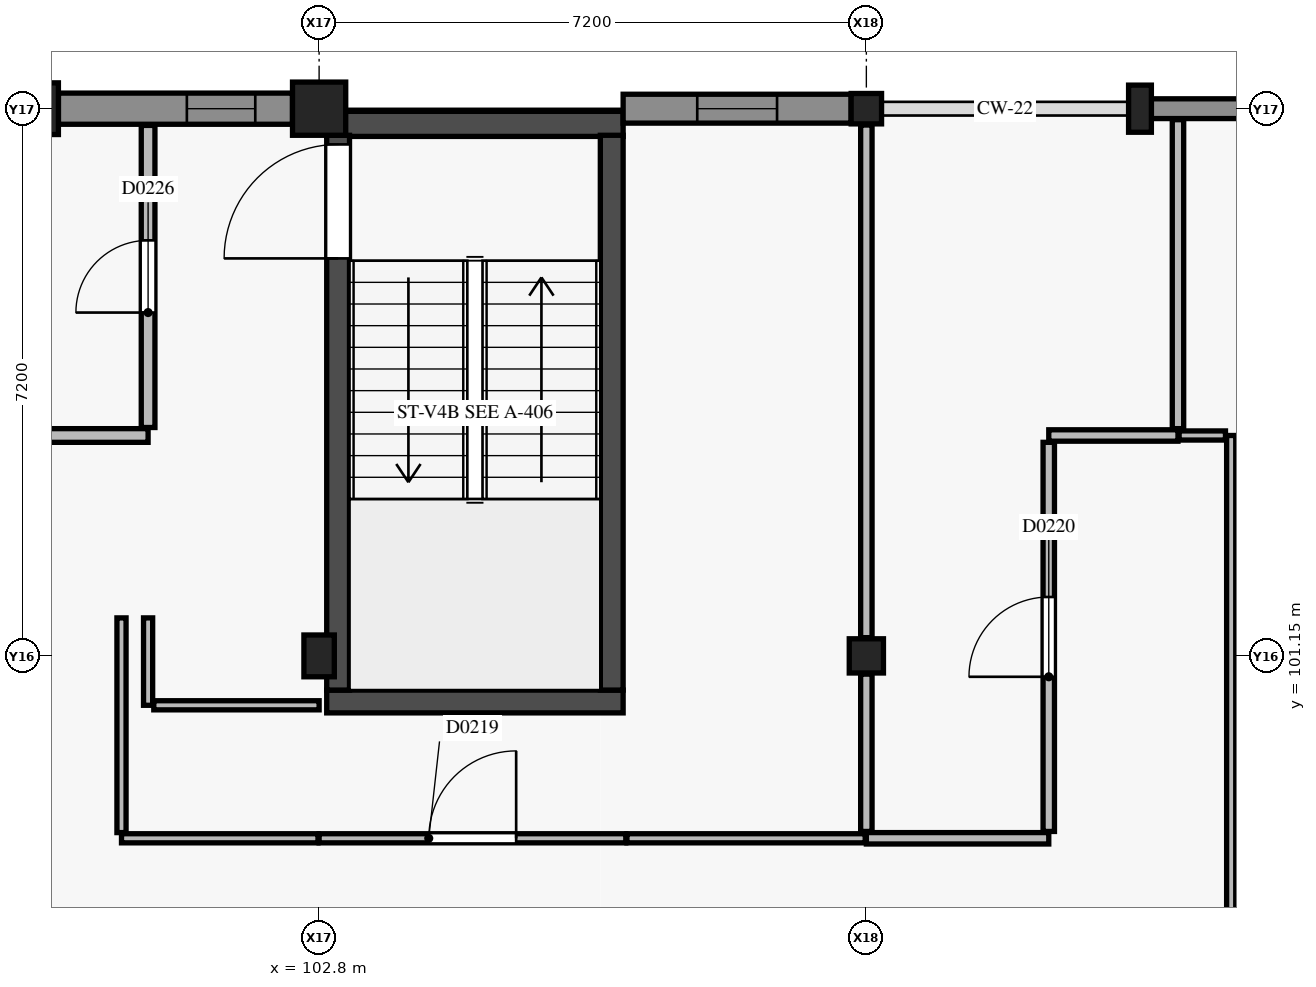
"""IFC4 building model, lengths in metres.
Left out: names, types, materials, properties, quantities, classifications, styles, units other than length and angle.
Written with IfcOpenShell. Run it as: python <this file> out.ifc"""

import sys

from ifc_helpers import new_model, si_unit, direction, frame, frame_2d, origin, origin_2d, place, context, subcontext, project, spatial, rectangle, circle, extrude, element, fill, save


model = new_model("IFC4")
c1 = context("Model", 3, precision=1e-05, world=origin(), true_north=direction((0.0, 1.0)))
c2 = subcontext(c1, "Body", "Model", "MODEL_VIEW")
j1 = project(units=[si_unit("LENGTHUNIT", "METRE"), si_unit("PLANEANGLEUNIT", "RADIAN")], contexts=[c1])
p1 = place(None, origin())
s1 = spatial("IfcSite", under=j1, at=p1, CompositionType="ELEMENT")
p2 = place(p1, origin())
s2 = spatial("IfcBuilding", under=s1, at=p2, CompositionType="ELEMENT")
p3 = place(p2, frame((0.0, 0.0, 4.8)))
s3 = spatial("IfcBuildingStorey", under=s2, at=p3, CompositionType="ELEMENT", Elevation=4.8)
p4 = place(p3, frame((102.8, 101.15, 0.0), z_axis=(0.0, 0.0, 1.0), x_axis=(1.0, 0.0, 0.0)))
e1 = element("IfcColumn", 1, at=p4, inside=s3, PredefinedType="COLUMN", context=c2, shape_type="SweptSolid", body=[
    extrude(rectangle(XDim=0.4, YDim=0.55, at=origin_2d()), origin(), (0.0, 0.0, 1.0), 4.2),
])
p5 = place(p3, frame((102.8, 108.35, 0.0), z_axis=(0.0, 0.0, 1.0), x_axis=(1.0, 0.0, 0.0)))
e2 = element("IfcColumn", 2, at=p5, inside=s3, PredefinedType="COLUMN", context=c2, shape_type="SweptSolid", body=[
    extrude(circle(Radius=0.35, at=origin_2d()), origin(), (0.0, 0.0, 1.0), 4.2),
])
p6 = place(p3, frame((110.0, 101.15, 0.0), z_axis=(0.0, 0.0, 1.0), x_axis=(1.0, 0.0, 0.0)))
e3 = element("IfcColumn", 3, at=p6, inside=s3, PredefinedType="COLUMN", context=c2, shape_type="SweptSolid", body=[
    extrude(rectangle(XDim=0.45, YDim=0.45, at=origin_2d()), origin(), (0.0, 0.0, 1.0), 4.2),
])
p7 = place(p3, frame((110.0, 108.35, 0.0), z_axis=(0.0, 0.0, 1.0), x_axis=(1.0, 0.0, 0.0)))
e4 = element("IfcColumn", 4, at=p7, inside=s3, PredefinedType="COLUMN", context=c2, shape_type="SweptSolid", body=[
    extrude(rectangle(XDim=0.4, YDim=0.4, at=origin_2d()), origin(), (0.0, 0.0, 1.0), 4.2),
])
p8 = place(p3, frame((99.2, 108.35, 0.0), z_axis=(0.0, 0.0, 1.0), x_axis=(1.0, 0.0, 0.0)))
e5 = element("IfcColumn", 5, at=p8, inside=s3, PredefinedType="PILASTER", context=c2, shape_type="SweptSolid", body=[
    extrude(rectangle(XDim=0.34, YDim=0.68, at=origin_2d()), origin(), (0.0, 0.0, 1.0), 4.2),
])
p9 = place(p3, frame((113.6, 108.35, 0.0), z_axis=(0.0, 0.0, 1.0), x_axis=(1.0, 0.0, 0.0)))
e6 = element("IfcColumn", 6, at=p9, inside=s3, PredefinedType="PILASTER", context=c2, shape_type="SweptSolid", body=[
    extrude(rectangle(XDim=0.3, YDim=0.62, at=origin_2d()), origin(), (0.0, 0.0, 1.0), 4.2),
])
p10 = place(p3, frame((102.9, 100.55, 0.0), z_axis=(0.0, 0.0, 1.0), x_axis=(1.0, 0.0, 0.0)))
e7 = element("IfcWall", 7, at=p10, inside=s3, PredefinedType="SHEAR", context=c2, shape_type="SweptSolid", body=[
    extrude(rectangle(XDim=3.9, YDim=0.3, at=frame_2d((1.95, 0.0))), origin(), (0.0, 0.0, 1.0), 3.95),
])
p11 = place(p3, frame((102.9, 108.15, 0.0), z_axis=(0.0, 0.0, 1.0), x_axis=(1.0, 0.0, 0.0)))
e8 = element("IfcWall", 8, at=p11, inside=s3, PredefinedType="SHEAR", context=c2, shape_type="SweptSolid", body=[
    extrude(rectangle(XDim=3.9, YDim=0.33, at=frame_2d((1.95, 0.0))), origin(), (0.0, 0.0, 1.0), 3.95),
])
p12 = place(p3, frame((103.05, 100.7, 0.0), z_axis=(0.0, 0.0, 1.0), x_axis=(0.0, 1.0, 0.0)))
e9 = element("IfcWall", 9, at=p12, inside=s3, PredefinedType="SHEAR", context=c2, shape_type="SweptSolid", body=[
    extrude(rectangle(XDim=7.3, YDim=0.3, at=frame_2d((3.65, 0.0))), origin(), (0.0, 0.0, 1.0), 3.95),
])
p13 = place(p12, frame((5.68, 0.0, 0.0)))
e10 = element("IfcOpeningElement", 10, at=p13, cuts=e9, PredefinedType="OPENING", context=c2, shape_type="SweptSolid", body=[
    extrude(rectangle(XDim=1.5, YDim=2.15, at=frame_2d((0.75, 1.075))), frame((0.0, 0.16, 0.0), z_axis=(0.0, -1.0, 0.0), x_axis=(1.0, 0.0, 0.0)), (0.0, 0.0, 1.0), 0.32),
])
p14 = place(p3, frame((106.65, 100.7, 0.0), z_axis=(0.0, 0.0, 1.0), x_axis=(0.0, 1.0, 0.0)))
e11 = element("IfcWall", 11, at=p14, inside=s3, PredefinedType="SHEAR", context=c2, shape_type="SweptSolid", body=[
    extrude(rectangle(XDim=7.3, YDim=0.3, at=frame_2d((3.65, 0.0))), origin(), (0.0, 0.0, 1.0), 3.95),
])
p15 = place(p3, frame((99.37, 108.35, 0.0), z_axis=(0.0, 0.0, 1.0), x_axis=(1.0, 0.0, 0.0)))
e12 = element("IfcWall", 12, at=p15, inside=s3, PredefinedType="USERDEFINED", context=c2, shape_type="SweptSolid", body=[
    extrude(rectangle(XDim=3.08, YDim=0.41, at=frame_2d((1.54, 0.0))), origin(), (0.0, 0.0, 1.0), 3.13),
])
p16 = place(p15, frame((1.69, 0.0, 0.9)))
e13 = element("IfcOpeningElement", 13, at=p16, cuts=e12, PredefinedType="OPENING", context=c2, shape_type="SweptSolid", body=[
    extrude(rectangle(XDim=0.9, YDim=1.8, at=frame_2d((0.45, 0.9))), frame((0.0, 0.215, 0.0), z_axis=(0.0, -1.0, 0.0), x_axis=(1.0, 0.0, 0.0)), (0.0, 0.0, 1.0), 0.43),
])
p17 = place(p3, frame((106.8, 108.35, 0.0), z_axis=(0.0, 0.0, 1.0), x_axis=(1.0, 0.0, 0.0)))
e14 = element("IfcWall", 14, at=p17, inside=s3, PredefinedType="USERDEFINED", context=c2, shape_type="SweptSolid", body=[
    extrude(rectangle(XDim=3.0, YDim=0.38, at=frame_2d((1.5, 0.0))), origin(), (0.0, 0.0, 1.0), 3.13),
])
p18 = place(p17, frame((0.975, 0.0, 0.9)))
e15 = element("IfcOpeningElement", 15, at=p18, cuts=e14, PredefinedType="OPENING", context=c2, shape_type="SweptSolid", body=[
    extrude(rectangle(XDim=1.05, YDim=1.8, at=frame_2d((0.525, 0.9))), frame((0.0, 0.2, 0.0), z_axis=(0.0, -1.0, 0.0), x_axis=(1.0, 0.0, 0.0)), (0.0, 0.0, 1.0), 0.4),
])
p19 = place(p3, frame((113.75, 108.35, 0.0), z_axis=(0.0, 0.0, 1.0), x_axis=(1.0, 0.0, 0.0)))
e16 = element("IfcWall", 16, at=p19, inside=s3, PredefinedType="SOLIDWALL", context=c2, shape_type="SweptSolid", body=[
    extrude(rectangle(XDim=3.15, YDim=0.26, at=frame_2d((1.575, 0.0))), origin(), (0.0, 0.0, 1.0), 3.13),
])
p20 = place(p19, frame((1.16, 0.0, 0.9)))
e17 = element("IfcOpeningElement", 17, at=p20, cuts=e16, PredefinedType="OPENING", context=c2, shape_type="SweptSolid", body=[
    extrude(rectangle(XDim=1.2, YDim=1.8, at=frame_2d((0.6, 0.9))), frame((0.0, 0.14, 0.0), z_axis=(0.0, -1.0, 0.0), x_axis=(1.0, 0.0, 0.0)), (0.0, 0.0, 1.0), 0.28),
])
p21 = place(p3, frame((98.325, 104.05, 0.0), z_axis=(0.0, 0.0, 1.0), x_axis=(1.0, 0.0, 0.0)))
e18 = element("IfcWall", 18, at=p21, inside=s3, PredefinedType="PLUMBINGWALL", context=c2, shape_type="SweptSolid", body=[
    extrude(rectangle(XDim=2.225, YDim=0.18, at=frame_2d((1.113, 0.0))), origin(), (0.0, 0.0, 1.0), 3.95),
])
p22 = place(p3, frame((100.55, 104.155, 0.0), z_axis=(0.0, 0.0, 1.0), x_axis=(0.0, 1.0, 0.0)))
e19 = element("IfcWall", 19, at=p22, inside=s3, PredefinedType="PLUMBINGWALL", context=c2, shape_type="SweptSolid", body=[
    extrude(rectangle(XDim=3.975, YDim=0.18, at=frame_2d((1.987, 0.0))), origin(), (0.0, 0.0, 1.0), 3.515),
])
p23 = place(p22, frame((1.512, 0.0, 0.0)))
e20 = element("IfcOpeningElement", 20, at=p23, cuts=e19, PredefinedType="OPENING", context=c2, shape_type="SweptSolid", body=[
    extrude(rectangle(XDim=0.95, YDim=2.1, at=frame_2d((0.475, 1.05))), frame((0.0, 0.1, 0.0), z_axis=(0.0, -1.0, 0.0), x_axis=(1.0, 0.0, 0.0)), (0.0, 0.0, 1.0), 0.2),
])
p24 = place(p3, frame((110.0, 98.75, 0.0), z_axis=(0.0, 0.0, 1.0), x_axis=(1.0, 0.0, 0.0)))
e21 = element("IfcWall", 21, at=p24, inside=s3, PredefinedType="PARTITIONING", context=c2, shape_type="SweptSolid", body=[
    extrude(rectangle(XDim=2.4, YDim=0.15, at=frame_2d((1.2, 0.0))), origin(), (0.0, 0.0, 1.0), 3.455),
])
p25 = place(p3, frame((112.4, 104.05, 0.0), z_axis=(0.0, 0.0, 1.0), x_axis=(1.0, 0.0, 0.0)))
e22 = element("IfcWall", 22, at=p25, inside=s3, PredefinedType="PARTITIONING", context=c2, shape_type="SweptSolid", body=[
    extrude(rectangle(XDim=1.7, YDim=0.15, at=frame_2d((0.85, 0.0))), origin(), (0.0, 0.0, 1.0), 3.95),
])
p26 = place(p3, frame((112.4, 98.84, 0.0), z_axis=(0.0, 0.0, 1.0), x_axis=(0.0, 1.0, 0.0)))
e23 = element("IfcWall", 23, at=p26, inside=s3, PredefinedType="PARTITIONING", context=c2, shape_type="SweptSolid", body=[
    extrude(rectangle(XDim=5.12, YDim=0.15, at=frame_2d((2.56, 0.0))), origin(), (0.0, 0.0, 1.0), 3.455),
])
p27 = place(p26, frame((2.035, 0.0, 0.0)))
e24 = element("IfcOpeningElement", 24, at=p27, cuts=e23, PredefinedType="OPENING", context=c2, shape_type="SweptSolid", body=[
    extrude(rectangle(XDim=1.05, YDim=2.15, at=frame_2d((0.525, 1.075))), frame((0.0, 0.085, 0.0), z_axis=(0.0, -1.0, 0.0), x_axis=(1.0, 0.0, 0.0)), (0.0, 0.0, 1.0), 0.17),
])
p28 = place(p3, frame((114.8, 87.115, 0.0), z_axis=(0.0, 0.0, 1.0), x_axis=(0.0, 1.0, 0.0)))
e25 = element("IfcWall", 25, at=p28, inside=s3, PredefinedType="PARTITIONING", context=c2, shape_type="SweptSolid", body=[
    extrude(rectangle(XDim=16.935, YDim=0.12, at=frame_2d((8.468, 0.0))), origin(), (0.0, 0.0, 1.0), 3.285),
])
p29 = place(p28, frame((7.893, 0.0, 0.0)))
e26 = element("IfcOpeningElement", 26, at=p29, cuts=e25, PredefinedType="OPENING", context=c2, shape_type="SweptSolid", body=[
    extrude(rectangle(XDim=1.15, YDim=2.15, at=frame_2d((0.575, 1.075))), frame((0.0, 0.07, 0.0), z_axis=(0.0, -1.0, 0.0), x_axis=(1.0, 0.0, 0.0)), (0.0, 0.0, 1.0), 0.14),
])
p30 = place(p3, frame((114.115, 104.05, 0.0), z_axis=(0.0, 0.0, 1.0), x_axis=(1.0, 0.0, 0.0)))
e27 = element("IfcWall", 27, at=p30, inside=s3, PredefinedType="PARTITIONING", context=c2, shape_type="SweptSolid", body=[
    extrude(rectangle(XDim=0.61, YDim=0.12, at=frame_2d((0.305, 0.0))), origin(), (0.0, 0.0, 1.0), 3.95),
])
p31 = place(p3, frame((100.55, 100.5, 0.0), z_axis=(0.0, 0.0, 1.0), x_axis=(0.0, 1.0, 0.0)))
e28 = element("IfcWall", 28, at=p31, inside=s3, PredefinedType="PARTITIONING", context=c2, shape_type="SweptSolid", body=[
    extrude(rectangle(XDim=1.15, YDim=0.12, at=frame_2d((0.575, 0.0))), origin(), (0.0, 0.0, 1.0), 3.355),
])
p32 = place(p3, frame((100.625, 100.5, 0.0), z_axis=(0.0, 0.0, 1.0), x_axis=(1.0, 0.0, 0.0)))
e29 = element("IfcWall", 29, at=p32, inside=s3, PredefinedType="PARTITIONING", context=c2, shape_type="SweptSolid", body=[
    extrude(rectangle(XDim=2.175, YDim=0.12, at=frame_2d((1.087, 0.0))), origin(), (0.0, 0.0, 1.0), 3.285),
])
p33 = place(p3, frame((106.85, 98.75, 0.0), z_axis=(0.0, 0.0, 1.0), x_axis=(1.0, 0.0, 0.0)))
e30 = element("IfcWall", 30, at=p33, inside=s3, PredefinedType="PARTITIONING", context=c2, shape_type="SweptSolid", body=[
    extrude(rectangle(XDim=3.135, YDim=0.12, at=frame_2d((1.567, 0.0))), origin(), (0.0, 0.0, 1.0), 3.455),
])
p34 = place(p3, frame((102.8, 98.75, 0.0), z_axis=(0.0, 0.0, 1.0), x_axis=(1.0, 0.0, 0.0)))
e31 = element("IfcWall", 31, at=p34, inside=s3, PredefinedType="PARTITIONING", context=c2, shape_type="SweptSolid", body=[
    extrude(rectangle(XDim=4.035, YDim=0.12, at=frame_2d((2.018, 0.0))), origin(), (0.0, 0.0, 1.0), 3.285),
])
p35 = place(p34, frame((1.442, 0.0, 0.0)))
e32 = element("IfcOpeningElement", 32, at=p35, cuts=e31, PredefinedType="OPENING", context=c2, shape_type="SweptSolid", body=[
    extrude(rectangle(XDim=1.15, YDim=2.15, at=frame_2d((0.575, 1.075))), frame((0.0, 0.07, 0.0), z_axis=(0.0, -1.0, 0.0), x_axis=(1.0, 0.0, 0.0)), (0.0, 0.0, 1.0), 0.14),
])
p36 = place(p3, frame((100.2, 98.75, 0.0), z_axis=(0.0, 0.0, 1.0), x_axis=(1.0, 0.0, 0.0)))
e33 = element("IfcWall", 33, at=p36, inside=s3, PredefinedType="PARTITIONING", context=c2, shape_type="SweptSolid", body=[
    extrude(rectangle(XDim=2.585, YDim=0.12, at=frame_2d((1.292, 0.0))), origin(), (0.0, 0.0, 1.0), 3.285),
])
p37 = place(p3, frame((100.2, 98.825, 0.0), z_axis=(0.0, 0.0, 1.0), x_axis=(0.0, 1.0, 0.0)))
e34 = element("IfcWall", 34, at=p37, inside=s3, PredefinedType="PARTITIONING", context=c2, shape_type="SweptSolid", body=[
    extrude(rectangle(XDim=2.825, YDim=0.12, at=frame_2d((1.413, 0.0))), origin(), (0.0, 0.0, 1.0), 3.355),
])
p38 = place(p3, frame((114.1, 104.14, 0.0), z_axis=(0.0, 0.0, 1.0), x_axis=(0.0, 1.0, 0.0)))
e35 = element("IfcWall", 35, at=p38, inside=s3, PredefinedType="PARTITIONING", context=c2, shape_type="SweptSolid", body=[
    extrude(rectangle(XDim=4.065, YDim=0.15, at=frame_2d((2.033, 0.0))), origin(), (0.0, 0.0, 1.0), 3.515),
])
p39 = place(p3, frame((110.0, 98.84, 0.0), z_axis=(0.0, 0.0, 1.0), x_axis=(0.0, 1.0, 0.0)))
e36 = element("IfcWall", 36, at=p39, inside=s3, PredefinedType="PARTITIONING", context=c2, shape_type="SweptSolid", body=[
    extrude(rectangle(XDim=2.07, YDim=0.15, at=frame_2d((1.035, 0.0))), origin(), (0.0, 0.0, 1.0), 3.455),
])
p40 = place(p3, frame((110.0, 101.39, 0.0), z_axis=(0.0, 0.0, 1.0), x_axis=(0.0, 1.0, 0.0)))
e37 = element("IfcWall", 37, at=p40, inside=s3, PredefinedType="PARTITIONING", context=c2, shape_type="SweptSolid", body=[
    extrude(rectangle(XDim=6.745, YDim=0.15, at=frame_2d((3.373, 0.0))), origin(), (0.0, 0.0, 1.0), 3.215),
])
p41 = place(p16, origin())
e38 = element("IfcWindow", 38, at=p41, inside=s3, PartitioningType="SINGLE_PANEL", PredefinedType="WINDOW", context=c2, shape_type="SweptSolid", body=[
    extrude(rectangle(XDim=0.9, YDim=1.8, at=frame_2d((0.45, 0.9))), frame((0.0, 0.03, 0.0), z_axis=(0.0, -1.0, 0.0), x_axis=(1.0, 0.0, 0.0)), (0.0, 0.0, 1.0), 0.06),
])
fill(e13, e38)
p42 = place(p18, origin())
e39 = element("IfcWindow", 39, at=p42, inside=s3, PartitioningType="SINGLE_PANEL", PredefinedType="WINDOW", context=c2, shape_type="SweptSolid", body=[
    extrude(rectangle(XDim=1.05, YDim=1.8, at=frame_2d((0.525, 0.9))), frame((0.0, 0.03, 0.0), z_axis=(0.0, -1.0, 0.0), x_axis=(1.0, 0.0, 0.0)), (0.0, 0.0, 1.0), 0.06),
])
fill(e15, e39)
p43 = place(p13, origin())
e40 = element("IfcDoor", 40, at=p43, inside=s3, OperationType="SINGLE_SWING_LEFT", PredefinedType="DOOR", context=c2, shape_type="SweptSolid", body=[
    extrude(rectangle(XDim=1.5, YDim=2.15, at=frame_2d((0.75, 1.075))), frame((0.0, 0.025, 0.0), z_axis=(0.0, -1.0, 0.0), x_axis=(1.0, 0.0, 0.0)), (0.0, 0.0, 1.0), 0.05),
])
fill(e10, e40)
p44 = place(p35, origin())
e41 = element("IfcDoor", 41, at=p44, inside=s3, OperationType="SINGLE_SWING_RIGHT", PredefinedType="DOOR", context=c2, shape_type="SweptSolid", body=[
    extrude(rectangle(XDim=1.15, YDim=2.15, at=frame_2d((0.575, 1.075))), frame((0.0, 0.025, 0.0), z_axis=(0.0, -1.0, 0.0), x_axis=(1.0, 0.0, 0.0)), (0.0, 0.0, 1.0), 0.05),
])
fill(e32, e41)
p45 = place(p27, origin())
e42 = element("IfcDoor", 42, at=p45, inside=s3, OperationType="SINGLE_SWING_LEFT", PredefinedType="DOOR", context=c2, shape_type="SweptSolid", body=[
    extrude(rectangle(XDim=1.05, YDim=2.15, at=frame_2d((0.525, 1.075))), frame((0.0, 0.025, 0.0), z_axis=(0.0, -1.0, 0.0), x_axis=(1.0, 0.0, 0.0)), (0.0, 0.0, 1.0), 0.05),
])
fill(e24, e42)
p46 = place(p23, origin())
e43 = element("IfcDoor", 43, at=p46, inside=s3, OperationType="SINGLE_SWING_LEFT", PredefinedType="DOOR", context=c2, shape_type="SweptSolid", body=[
    extrude(rectangle(XDim=0.95, YDim=2.1, at=frame_2d((0.475, 1.05))), frame((0.0, 0.025, 0.0), z_axis=(0.0, -1.0, 0.0), x_axis=(1.0, 0.0, 0.0)), (0.0, 0.0, 1.0), 0.05),
])
fill(e20, e43)
save(model, sys.argv[1])
